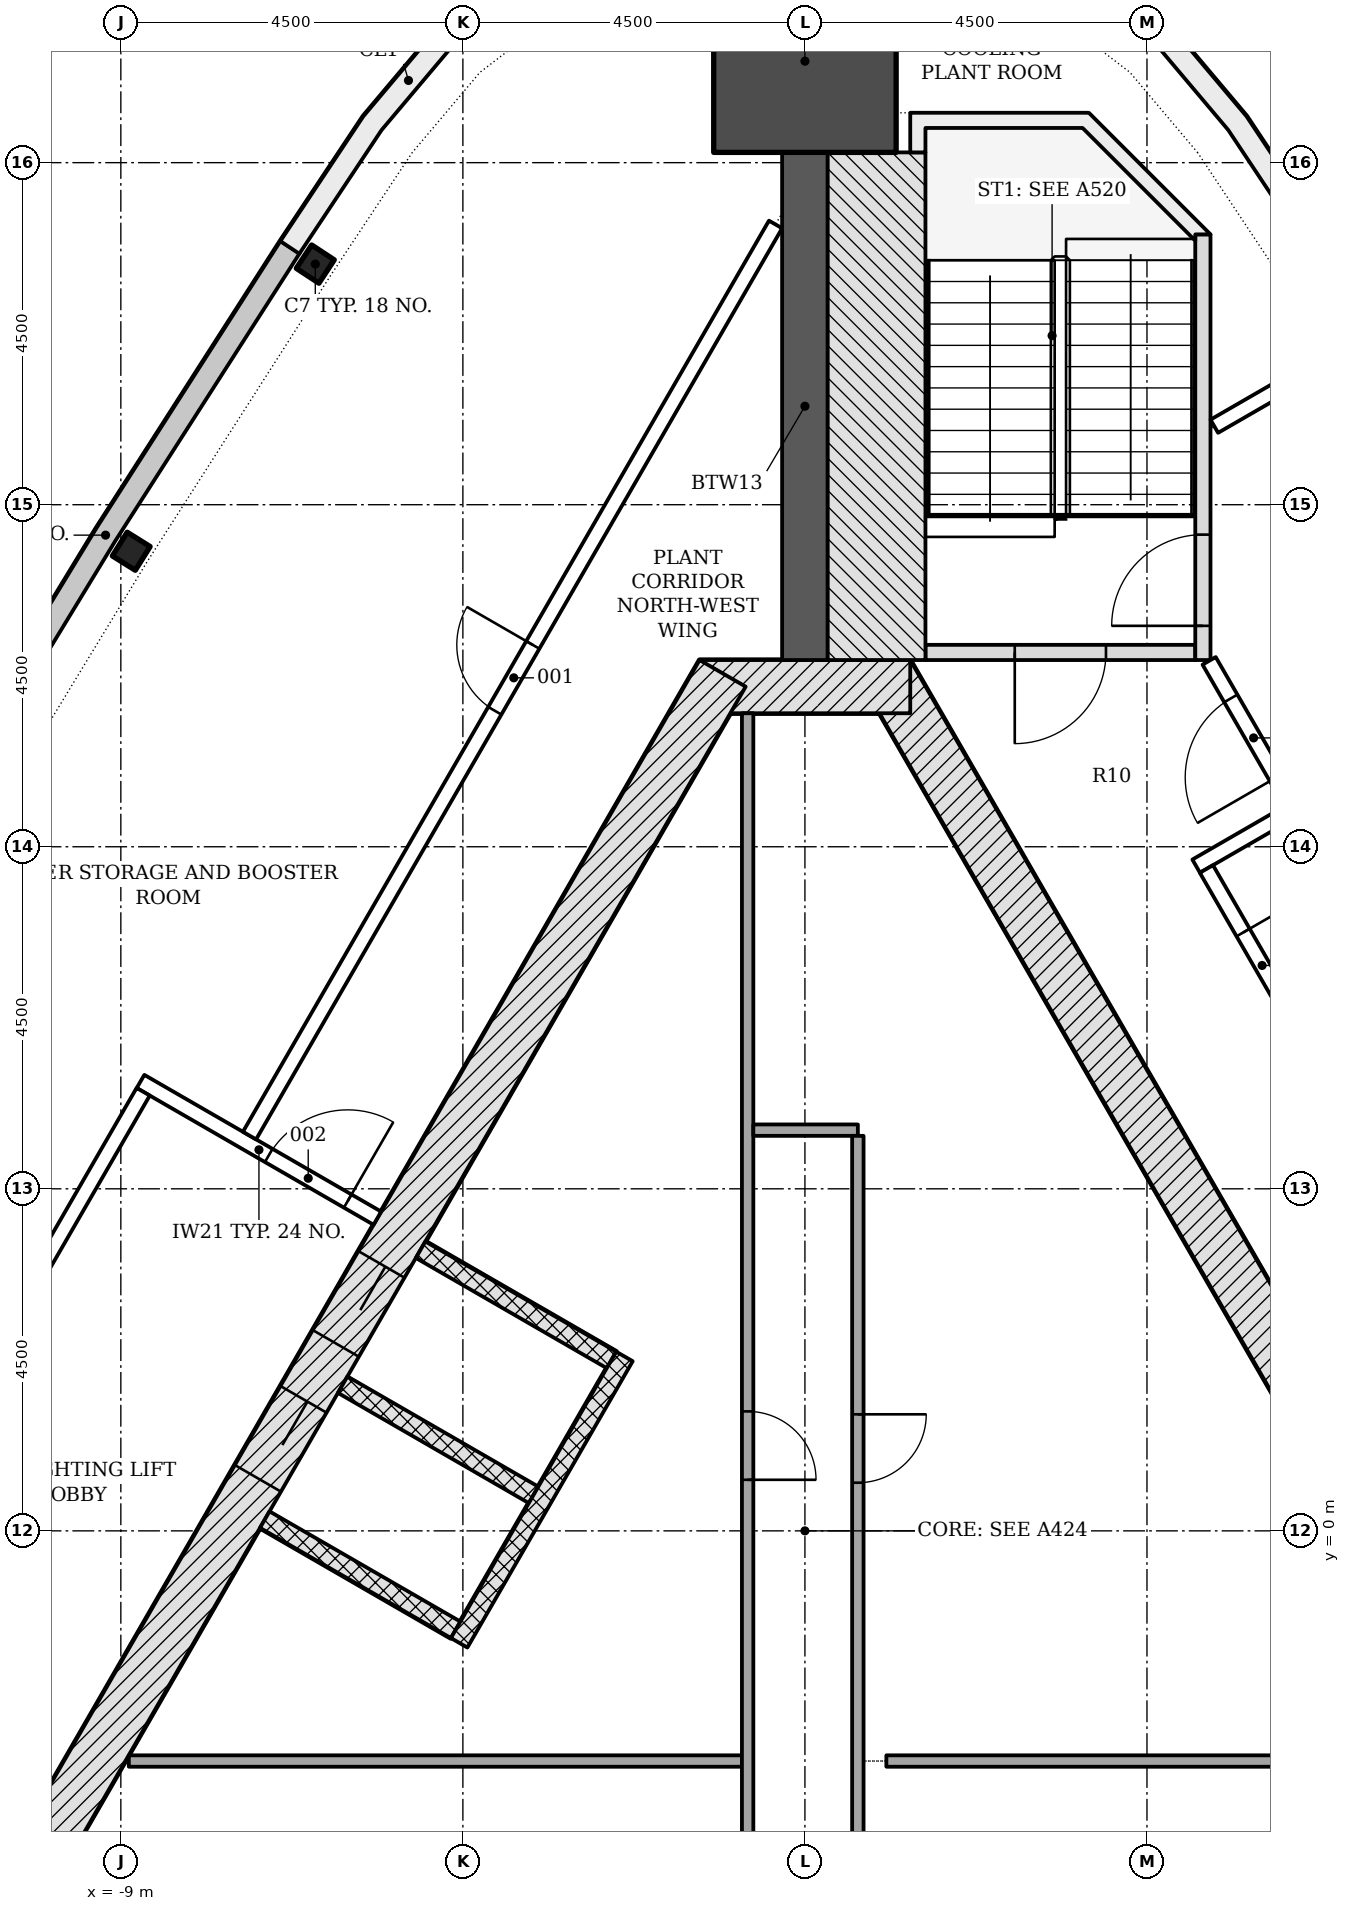
"""IFC4 building model, lengths in metres.
Left out: names, types, materials, properties, quantities, classifications, styles, units other than length and angle.
Written with IfcOpenShell. Run it as: python <this file> out.ifc"""

import sys

from ifc_helpers import new_model, si_unit, direction, frame, frame_2d, origin, origin_2d, place, context, subcontext, project, spatial, polyline, rectangle, i_section, outline, extrude, element, fill, save


model = new_model("IFC4")
c1 = context("Model", 3, precision=1e-05, world=origin(), true_north=direction((0.0, 1.0)))
c2 = subcontext(c1, "Body", "Model", "MODEL_VIEW")
j1 = project(units=[si_unit("LENGTHUNIT", "METRE"), si_unit("PLANEANGLEUNIT", "RADIAN")], contexts=[c1])
p1 = place(None, origin())
s1 = spatial("IfcSite", under=j1, at=p1, CompositionType="ELEMENT")
p2 = place(p1, origin())
s2 = spatial("IfcBuilding", under=s1, at=p2, CompositionType="ELEMENT")
p3 = place(p2, frame((0.0, 0.0, 288.6)))
s3 = spatial("IfcBuildingStorey", under=s2, at=p3, CompositionType="ELEMENT", Elevation=288.6)
p4 = place(p3, frame((10.311, -4.703, -0.25), z_axis=(0.0, 0.0, 1.0), x_axis=(-0.500001446645, 0.866024568562, 0.0)))
e1 = element("IfcWall", 1, at=p4, inside=s3, PredefinedType="SHEAR", context=c2, shape_type="SweptSolid", body=[
    extrude(rectangle(XDim=18.458, YDim=0.7, at=frame_2d((9.229, 0.0))), origin(), (0.0, 0.0, 1.0), 4.5),
])
p5 = place(p3, frame((1.386, 11.106, -0.25), z_axis=(0.0, 0.0, 1.0), x_axis=(-1.0, 0.0, 0.0)))
e2 = element("IfcWall", 2, at=p5, inside=s3, PredefinedType="SHEAR", context=c2, shape_type="SweptSolid", body=[
    extrude(rectangle(XDim=2.771, YDim=0.7, at=frame_2d((1.386, 0.0))), origin(), (0.0, 0.0, 1.0), 4.5),
])
p6 = place(p3, frame((-1.083, 11.281, -0.25), z_axis=(0.0, 0.0, 1.0), x_axis=(-0.500001446645, -0.866024568562, 0.0)))
e3 = element("IfcWall", 3, at=p6, inside=s3, PredefinedType="SHEAR", context=c2, shape_type="SweptSolid", body=[
    extrude(rectangle(XDim=18.458, YDim=0.7, at=frame_2d((9.229, 0.0))), origin(), (0.0, 0.0, 1.0), 4.5),
])
p7 = place(p6, frame((8.979, 0.0, 0.25)))
e4 = element("IfcOpeningElement", 4, at=p7, cuts=e3, PredefinedType="OPENING", context=c2, shape_type="SweptSolid", body=[
    extrude(rectangle(XDim=1.2, YDim=2.1, at=frame_2d((0.6, 1.05))), frame((0.0, 0.36, 0.0), z_axis=(0.0, -1.0, 0.0), x_axis=(1.0, 0.0, 0.0)), (0.0, 0.0, 1.0), 0.72),
])
p8 = place(p6, frame((11.029, 0.0, 0.25)))
e5 = element("IfcOpeningElement", 5, at=p8, cuts=e3, PredefinedType="OPENING", context=c2, shape_type="SweptSolid", body=[
    extrude(rectangle(XDim=1.2, YDim=2.1, at=frame_2d((0.6, 1.05))), frame((0.0, 0.36, 0.0), z_axis=(0.0, -1.0, 0.0), x_axis=(1.0, 0.0, 0.0)), (0.0, 0.0, 1.0), 0.72),
])
p9 = place(p3, frame((0.0, 11.456, -0.25), z_axis=(0.0, 0.0, 1.0), x_axis=(0.0, 1.0, 0.0)))
e6 = element("IfcWall", 6, at=p9, inside=s3, PredefinedType="SHEAR", context=c2, shape_type="SweptSolid", body=[
    extrude(rectangle(XDim=6.679, YDim=0.6, at=frame_2d((3.339, 0.0))), origin(), (0.0, 0.0, 1.0), 4.5),
])
p10 = place(p3, frame((0.0, 19.335, -0.25), z_axis=(0.0, 0.0, 1.0), x_axis=(0.0, 1.0, 0.0)))
e7 = element("IfcColumn", 7, at=p10, inside=s3, PredefinedType="COLUMN", context=c2, shape_type="SweptSolid", body=[
    extrude(rectangle(XDim=2.4, YDim=2.4, at=origin_2d()), origin(), (0.0, 0.0, 1.0), 4.5),
])
for number, where, z_axis, x_axis in (
    (8, (-6.442, 16.666, -0.25), (0.0, 0.0, 1.0), (-0.549, -0.836, 0.0)),
    (9, (-8.863, 12.888, -0.25), (0.0, 0.0, 1.0), (-0.53, -0.848, 0.0)),
):
    element("IfcColumn", number, at=place(p3, frame(where, z_axis=z_axis, x_axis=x_axis)), inside=s3, PredefinedType="COLUMN", context=c2, shape_type="SweptSolid", body=[
        extrude(i_section(OverallWidth=0.368, OverallDepth=0.356, WebThickness=0.011, FlangeThickness=0.018, FilletRadius=0.015, at=origin_2d()), origin(), (0.0, 0.0, 1.0), 4.5),
    ])
p11 = place(p3, origin())
e10 = element("IfcWall", 10, at=p11, inside=s3, PredefinedType="NOTDEFINED", context=c2, shape_type="SweptSolid", body=[
    extrude(outline(polyline([(-6.901, 16.968), (-9.33, 13.179), (-11.669, 9.335), (-11.413, 9.179), (-9.075, 13.02), (-6.649, 16.806), (-6.901, 16.968)])), origin(), (0.0, 0.0, 1.0), 4.25),
])
p12 = place(p3, origin())
e11 = element("IfcWall", 11, at=p12, inside=s3, PredefinedType="NOTDEFINED", context=c2, shape_type="SweptSolid", body=[
    extrude(outline(polyline([(6.901, 16.968), (5.81, 18.61), (4.83, 19.771), (3.623, 20.695), (2.244, 21.335), (0.76, 21.664), (-0.76, 21.664), (-2.244, 21.335), (-3.623, 20.695), (-4.83, 19.771), (-5.81, 18.61), (-6.901, 16.968), (-6.651, 16.802), (-5.569, 18.429), (-4.622, 19.553), (-3.466, 20.437), (-2.147, 21.05), (-0.727, 21.364), (0.727, 21.364), (2.147, 21.05), (3.466, 20.437), (4.622, 19.553), (5.569, 18.429), (6.651, 16.802), (6.901, 16.968)])), origin(), (0.0, 0.0, 1.0), 4.25),
])
for number, where, z_axis, x_axis in (
    (12, (-5.056, 3.699, -0.25), (0.0, 0.0, 1.0), (0.866, -0.5, 0.0)),
    (13, (-6.081, 1.923, -0.25), (0.0, 0.0, 1.0), (0.866, -0.5, 0.0)),
    (14, (-7.106, 0.148, -0.25), (0.0, 0.0, 1.0), (0.866, -0.5, 0.0)),
):
    element("IfcWall", number, at=place(p3, frame(where, z_axis=z_axis, x_axis=x_axis)), inside=s3, PredefinedType="PARTITIONING", context=c2, shape_type="SweptSolid", body=[
        extrude(rectangle(XDim=2.9, YDim=0.25, at=frame_2d((1.45, 0.0))), origin(), (0.0, 0.0, 1.0), 4.5),
    ])
p13 = place(p3, frame((-2.374, 2.294, 0.0), z_axis=(0.0, 0.0, 1.0), x_axis=(-0.499996127374, -0.866027639635, 0.0)))
e15 = element("IfcWall", 15, at=p13, inside=s3, PredefinedType="PARTITIONING", context=c2, shape_type="SweptSolid", body=[
    extrude(rectangle(XDim=4.35, YDim=0.25, at=frame_2d((2.175, 0.0))), origin(), (0.0, 0.0, 1.0), 4.25),
])
p14 = place(p3, frame((-8.895, -3.028, 0.0), z_axis=(0.0, 0.0, 1.0), x_axis=(1.0, 0.0, 0.0)))
e16 = element("IfcWall", 16, at=p14, inside=s3, PredefinedType="PARTITIONING", context=c2, shape_type="SweptSolid", body=[
    extrude(rectangle(XDim=8.066, YDim=0.15, at=frame_2d((4.033, 0.0))), origin(), (0.0, 0.0, 1.0), 4.25),
])
p15 = place(p3, frame((-0.754, 10.756, 0.0), z_axis=(0.0, 0.0, 1.0), x_axis=(0.0, -1.0, 0.0)))
e17 = element("IfcWall", 17, at=p15, inside=s3, PredefinedType="PARTITIONING", context=c2, shape_type="SweptSolid", body=[
    extrude(rectangle(XDim=16.985, YDim=0.15, at=frame_2d((8.492, 0.0))), origin(), (0.0, 0.0, 1.0), 4.25),
])
p16 = place(p15, frame((9.185, 0.0, 0.0)))
e18 = element("IfcOpeningElement", 18, at=p16, cuts=e17, PredefinedType="OPENING", context=c2, shape_type="SweptSolid", body=[
    extrude(rectangle(XDim=0.9, YDim=2.1, at=frame_2d((0.45, 1.05))), frame((0.0, 0.085, 0.0), z_axis=(0.0, -1.0, 0.0), x_axis=(1.0, 0.0, 0.0)), (0.0, 0.0, 1.0), 0.17),
])
p17 = place(p3, frame((-0.679, 5.272, 0.0), z_axis=(0.0, 0.0, 1.0), x_axis=(1.0, 0.0, 0.0)))
e19 = element("IfcWall", 19, at=p17, inside=s3, PredefinedType="PARTITIONING", context=c2, shape_type="SweptSolid", body=[
    extrude(rectangle(XDim=1.375, YDim=0.15, at=frame_2d((0.688, 0.0))), origin(), (0.0, 0.0, 1.0), 4.25),
])
p18 = place(p3, frame((0.696, 5.197, 0.0), z_axis=(0.0, 0.0, 1.0), x_axis=(0.0, -1.0, 0.0)))
e20 = element("IfcWall", 20, at=p18, inside=s3, PredefinedType="PARTITIONING", context=c2, shape_type="SweptSolid", body=[
    extrude(rectangle(XDim=11.425, YDim=0.15, at=frame_2d((5.712, 0.0))), origin(), (0.0, 0.0, 1.0), 4.25),
])
p19 = place(p18, frame((3.664, 0.0, 0.0)))
e21 = element("IfcOpeningElement", 21, at=p19, cuts=e20, PredefinedType="OPENING", context=c2, shape_type="SweptSolid", body=[
    extrude(rectangle(XDim=0.9, YDim=2.1, at=frame_2d((0.45, 1.05))), frame((0.0, 0.085, 0.0), z_axis=(0.0, -1.0, 0.0), x_axis=(1.0, 0.0, 0.0)), (0.0, 0.0, 1.0), 0.17),
])
p20 = place(p3, frame((1.071, -3.028, 0.0), z_axis=(0.0, 0.0, 1.0), x_axis=(1.0, 0.0, 0.0)))
e22 = element("IfcWall", 22, at=p20, inside=s3, PredefinedType="PARTITIONING", context=c2, shape_type="SweptSolid", body=[
    extrude(rectangle(XDim=7.824, YDim=0.15, at=frame_2d((3.912, 0.0))), origin(), (0.0, 0.0, 1.0), 4.25),
])
p21 = place(p3, frame((5.135, 11.556, -0.25), z_axis=(0.0, 0.0, 1.0), x_axis=(-1.0, 0.0, 0.0)))
e23 = element("IfcWall", 23, at=p21, inside=s3, PredefinedType="SHEAR", context=c2, shape_type="SweptSolid", body=[
    extrude(rectangle(XDim=3.55, YDim=0.2, at=frame_2d((1.775, 0.0))), origin(), (0.0, 0.0, 1.0), 4.5),
])
p22 = place(p21, frame((1.175, 0.0, 0.25)))
e24 = element("IfcOpeningElement", 24, at=p22, cuts=e23, PredefinedType="OPENING", context=c2, shape_type="SweptSolid", body=[
    extrude(rectangle(XDim=1.2, YDim=2.1, at=frame_2d((0.6, 1.05))), frame((0.0, 0.11, 0.0), z_axis=(0.0, -1.0, 0.0), x_axis=(1.0, 0.0, 0.0)), (0.0, 0.0, 1.0), 0.22),
])
p23 = place(p3, frame((5.236, 11.456, -0.25), z_axis=(0.0, 0.0, 1.0), x_axis=(0.0, 1.0, 0.0)))
e25 = element("IfcWall", 25, at=p23, inside=s3, PredefinedType="SHEAR", context=c2, shape_type="SweptSolid", body=[
    extrude(rectangle(XDim=5.6, YDim=0.2, at=frame_2d((2.8, 0.0))), origin(), (0.0, 0.0, 1.0), 4.5),
])
p24 = place(p23, frame((0.45, 0.0, 0.25)))
e26 = element("IfcOpeningElement", 26, at=p24, cuts=e25, PredefinedType="OPENING", context=c2, shape_type="SweptSolid", body=[
    extrude(rectangle(XDim=1.2, YDim=2.1, at=frame_2d((0.6, 1.05))), frame((0.0, 0.11, 0.0), z_axis=(0.0, -1.0, 0.0), x_axis=(1.0, 0.0, 0.0)), (0.0, 0.0, 1.0), 0.22),
])
p25 = place(p3, frame((0.943, 11.456, -0.25), z_axis=(0.0, 0.0, 1.0), x_axis=(0.0, 1.0, 0.0)))
e27 = element("IfcWall", 27, at=p25, inside=s3, PredefinedType="SHEAR", context=c2, shape_type="SweptSolid", body=[
    extrude(rectangle(XDim=6.679, YDim=1.286, at=frame_2d((3.339, 0.0))), origin(), (0.0, 0.0, 1.0), 4.5),
])
p26 = place(p3, frame((0.0, 0.0, -0.25)))
e28 = element("IfcWall", 28, at=p26, inside=s3, PredefinedType="SHEAR", context=c2, shape_type="SweptSolid", body=[
    extrude(outline(polyline([(5.336, 17.056), (3.736, 18.656), (1.385, 18.656), (1.385, 18.135), (1.586, 18.135), (1.586, 18.456), (3.653, 18.456), (5.135, 16.974), (5.135, 17.056), (5.135, 17.056), (5.135, 17.056), (5.135, 17.056), (5.135, 17.056), (5.135, 17.056), (5.135, 17.056), (5.135, 17.056), (5.135, 17.056), (5.135, 17.056), (5.135, 17.056), (5.135, 17.056), (5.135, 17.056), (5.135, 17.056), (5.135, 17.056), (5.135, 17.056), (5.135, 17.056), (5.336, 17.056)])), origin(), (0.0, 0.0, 1.0), 4.5),
])
p27 = place(p3, frame((-8.741, 5.913, 0.0), z_axis=(0.0, 0.0, 1.0), x_axis=(0.866017220491, -0.500014173611, 0.0)))
e29 = element("IfcWall", 29, at=p27, inside=s3, PredefinedType="PARTITIONING", context=c2, shape_type="SweptSolid", body=[
    extrude(rectangle(XDim=3.598, YDim=0.2, at=frame_2d((1.799, 0.0))), origin(), (0.0, 0.0, 1.0), 4.25),
])
p28 = place(p27, frame((1.948, 0.0, 0.0)))
e30 = element("IfcOpeningElement", 30, at=p28, cuts=e29, PredefinedType="OPENING", context=c2, shape_type="SweptSolid", body=[
    extrude(rectangle(XDim=1.2, YDim=2.1, at=frame_2d((0.6, 1.05))), frame((0.0, 0.11, 0.0), z_axis=(0.0, -1.0, 0.0), x_axis=(1.0, 0.0, 0.0)), (0.0, 0.0, 1.0), 0.22),
])
p29 = place(p3, frame((-12.658, -1.068, 0.0), z_axis=(0.0, 0.0, 1.0), x_axis=(0.499996073327, 0.866027670838, 0.0)))
e31 = element("IfcWall", 31, at=p29, inside=s3, PredefinedType="PARTITIONING", context=c2, shape_type="SweptSolid", body=[
    extrude(rectangle(XDim=7.904, YDim=0.2, at=frame_2d((3.952, 0.0))), origin(), (0.0, 0.0, 1.0), 3.702),
])
p30 = place(p29, frame((0.541, 0.0, 0.0)))
e32 = element("IfcOpeningElement", 32, at=p30, cuts=e31, PredefinedType="OPENING", context=c2, shape_type="SweptSolid", body=[
    extrude(rectangle(XDim=1.2, YDim=2.1, at=frame_2d((0.6, 1.05))), frame((0.0, 0.11, 0.0), z_axis=(0.0, -1.0, 0.0), x_axis=(1.0, 0.0, 0.0)), (0.0, 0.0, 1.0), 0.22),
])
p31 = place(p3, frame((-7.307, 5.2, 0.0), z_axis=(0.0, 0.0, 1.0), x_axis=(0.49999780173, 0.866026672953, 0.0)))
e33 = element("IfcWall", 33, at=p31, inside=s3, PredefinedType="PARTITIONING", context=c2, shape_type="SweptSolid", body=[
    extrude(rectangle(XDim=13.841, YDim=0.2, at=frame_2d((6.92, 0.0))), origin(), (0.0, 0.0, 1.0), 3.702),
])
p32 = place(p31, frame((6.454, 0.0, 0.0)))
e34 = element("IfcOpeningElement", 34, at=p32, cuts=e33, PredefinedType="OPENING", context=c2, shape_type="SweptSolid", body=[
    extrude(rectangle(XDim=1.0, YDim=2.1, at=frame_2d((0.5, 1.05))), frame((0.0, 0.11, 0.0), z_axis=(0.0, -1.0, 0.0), x_axis=(1.0, 0.0, 0.0)), (0.0, 0.0, 1.0), 0.22),
])
p33 = place(p3, frame((5.147, 8.745, 0.0), z_axis=(0.0, 0.0, 1.0), x_axis=(0.865987117328, 0.500066308224, 0.0)))
e35 = element("IfcWall", 35, at=p33, inside=s3, PredefinedType="PARTITIONING", context=c2, shape_type="SweptSolid", body=[
    extrude(rectangle(XDim=1.598, YDim=0.2, at=frame_2d((0.799, 0.0))), origin(), (0.0, 0.0, 1.0), 4.25),
])
p34 = place(p3, frame((6.395, 9.581, 0.0), z_axis=(0.0, 0.0, 1.0), x_axis=(-0.500003735859, 0.866023246874, 0.0)))
e36 = element("IfcWall", 36, at=p34, inside=s3, PredefinedType="PARTITIONING", context=c2, shape_type="SweptSolid", body=[
    extrude(rectangle(XDim=2.154, YDim=0.2, at=frame_2d((1.077, 0.0))), origin(), (0.0, 0.0, 1.0), 3.702),
])
p35 = place(p34, frame((0.383, 0.0, 0.0)))
e37 = element("IfcOpeningElement", 37, at=p35, cuts=e36, PredefinedType="OPENING", context=c2, shape_type="SweptSolid", body=[
    extrude(rectangle(XDim=1.2, YDim=2.1, at=frame_2d((0.6, 1.05))), frame((0.0, 0.11, 0.0), z_axis=(0.0, -1.0, 0.0), x_axis=(1.0, 0.0, 0.0)), (0.0, 0.0, 1.0), 0.22),
])
p36 = place(p3, frame((5.282, 8.708, 0.0), z_axis=(0.0, 0.0, 1.0), x_axis=(0.500001848211, -0.866024336717, 0.0)))
e38 = element("IfcWall", 38, at=p36, inside=s3, PredefinedType="PARTITIONING", context=c2, shape_type="SweptSolid", body=[
    extrude(rectangle(XDim=19.591, YDim=0.2, at=frame_2d((9.795, 0.0))), origin(), (0.0, 0.0, 1.0), 3.702),
])
p37 = place(p36, frame((12.923, 0.0, 0.0)))
e39 = element("IfcOpeningElement", 39, at=p37, cuts=e38, PredefinedType="OPENING", context=c2, shape_type="SweptSolid", body=[
    extrude(rectangle(XDim=1.0, YDim=2.1, at=frame_2d((0.5, 1.05))), frame((0.0, 0.11, 0.0), z_axis=(0.0, -1.0, 0.0), x_axis=(1.0, 0.0, 0.0)), (0.0, 0.0, 1.0), 0.22),
])
p38 = place(p36, frame((4.502, 0.0, 0.0)))
e40 = element("IfcOpeningElement", 40, at=p38, cuts=e38, PredefinedType="OPENING", context=c2, shape_type="SweptSolid", body=[
    extrude(rectangle(XDim=1.0, YDim=2.1, at=frame_2d((0.5, 1.05))), frame((0.0, 0.11, 0.0), z_axis=(0.0, -1.0, 0.0), x_axis=(1.0, 0.0, 0.0)), (0.0, 0.0, 1.0), 0.22),
])
p39 = place(p36, frame((0.965, 0.0, 0.0)))
e41 = element("IfcOpeningElement", 41, at=p39, cuts=e38, PredefinedType="OPENING", context=c2, shape_type="SweptSolid", body=[
    extrude(rectangle(XDim=1.0, YDim=2.1, at=frame_2d((0.5, 1.05))), frame((0.0, 0.11, 0.0), z_axis=(0.0, -1.0, 0.0), x_axis=(1.0, 0.0, 0.0)), (0.0, 0.0, 1.0), 0.22),
])
p40 = place(p3, frame((6.529, 15.192, 0.0), z_axis=(0.0, 0.0, 1.0), x_axis=(-0.866117824122, -0.499839889103, 0.0)))
e42 = element("IfcWall", 42, at=p40, inside=s3, PredefinedType="PARTITIONING", context=c2, shape_type="SweptSolid", body=[
    extrude(rectangle(XDim=1.32, YDim=0.2, at=frame_2d((0.66, 0.0))), origin(), (0.0, 0.0, 1.0), 4.25),
])
p41 = place(p7, origin())
e43 = element("IfcDoor", 43, at=p41, inside=s3, OperationType="DOUBLE_DOOR_SLIDING", PredefinedType="DOOR", context=c2, shape_type="SweptSolid", body=[
    extrude(rectangle(XDim=1.2, YDim=2.1, at=frame_2d((0.6, 1.05))), frame((0.0, 0.025, 0.0), z_axis=(0.0, -1.0, 0.0), x_axis=(1.0, 0.0, 0.0)), (0.0, 0.0, 1.0), 0.05),
])
fill(e4, e43)
p42 = place(p8, origin())
e44 = element("IfcDoor", 44, at=p42, inside=s3, OperationType="DOUBLE_DOOR_SLIDING", PredefinedType="DOOR", context=c2, shape_type="SweptSolid", body=[
    extrude(rectangle(XDim=1.2, YDim=2.1, at=frame_2d((0.6, 1.05))), frame((0.0, 0.025, 0.0), z_axis=(0.0, -1.0, 0.0), x_axis=(1.0, 0.0, 0.0)), (0.0, 0.0, 1.0), 0.05),
])
fill(e5, e44)
p43 = place(p16, origin())
e45 = element("IfcDoor", 45, at=p43, inside=s3, OperationType="SINGLE_SWING_RIGHT", PredefinedType="DOOR", context=c2, shape_type="SweptSolid", body=[
    extrude(rectangle(XDim=0.9, YDim=2.1, at=frame_2d((0.45, 1.05))), frame((0.0, 0.025, 0.0), z_axis=(0.0, -1.0, 0.0), x_axis=(1.0, 0.0, 0.0)), (0.0, 0.0, 1.0), 0.05),
])
fill(e18, e45)
p44 = place(p19, origin())
e46 = element("IfcDoor", 46, at=p44, inside=s3, OperationType="SINGLE_SWING_LEFT", PredefinedType="DOOR", context=c2, shape_type="SweptSolid", body=[
    extrude(rectangle(XDim=0.9, YDim=2.1, at=frame_2d((0.45, 1.05))), frame((0.0, 0.025, 0.0), z_axis=(0.0, -1.0, 0.0), x_axis=(1.0, 0.0, 0.0)), (0.0, 0.0, 1.0), 0.05),
])
fill(e21, e46)
p45 = place(p22, origin())
e47 = element("IfcDoor", 47, at=p45, inside=s3, OperationType="SINGLE_SWING_RIGHT", PredefinedType="DOOR", context=c2, shape_type="SweptSolid", body=[
    extrude(rectangle(XDim=1.2, YDim=2.1, at=frame_2d((0.6, 1.05))), frame((0.0, 0.025, 0.0), z_axis=(0.0, -1.0, 0.0), x_axis=(1.0, 0.0, 0.0)), (0.0, 0.0, 1.0), 0.05),
])
fill(e24, e47)
p46 = place(p24, origin())
e48 = element("IfcDoor", 48, at=p46, inside=s3, OperationType="SINGLE_SWING_LEFT", PredefinedType="DOOR", context=c2, shape_type="SweptSolid", body=[
    extrude(rectangle(XDim=1.2, YDim=2.1, at=frame_2d((0.6, 1.05))), frame((0.0, 0.025, 0.0), z_axis=(0.0, -1.0, 0.0), x_axis=(1.0, 0.0, 0.0)), (0.0, 0.0, 1.0), 0.05),
])
fill(e26, e48)
p47 = place(p32, origin())
e49 = element("IfcDoor", 49, at=p47, inside=s3, OperationType="SINGLE_SWING_RIGHT", PredefinedType="DOOR", context=c2, shape_type="SweptSolid", body=[
    extrude(rectangle(XDim=1.0, YDim=2.1, at=frame_2d((0.5, 1.05))), frame((0.0, 0.025, 0.0), z_axis=(0.0, -1.0, 0.0), x_axis=(1.0, 0.0, 0.0)), (0.0, 0.0, 1.0), 0.05),
])
fill(e34, e49)
p48 = place(p28, origin())
e50 = element("IfcDoor", 50, at=p48, inside=s3, OperationType="SINGLE_SWING_RIGHT", PredefinedType="DOOR", context=c2, shape_type="SweptSolid", body=[
    extrude(rectangle(XDim=1.2, YDim=2.1, at=frame_2d((0.6, 1.05))), frame((0.0, 0.025, 0.0), z_axis=(0.0, -1.0, 0.0), x_axis=(1.0, 0.0, 0.0)), (0.0, 0.0, 1.0), 0.05),
])
fill(e30, e50)
p49 = place(p39, origin())
e51 = element("IfcDoor", 51, at=p49, inside=s3, OperationType="SINGLE_SWING_LEFT", PredefinedType="DOOR", context=c2, shape_type="SweptSolid", body=[
    extrude(rectangle(XDim=1.0, YDim=2.1, at=frame_2d((0.5, 1.05))), frame((0.0, 0.025, 0.0), z_axis=(0.0, -1.0, 0.0), x_axis=(1.0, 0.0, 0.0)), (0.0, 0.0, 1.0), 0.05),
])
fill(e41, e51)
p50 = place(p35, origin())
e52 = element("IfcDoor", 52, at=p50, inside=s3, OperationType="SINGLE_SWING_LEFT", PredefinedType="DOOR", context=c2, shape_type="SweptSolid", body=[
    extrude(rectangle(XDim=1.2, YDim=2.1, at=frame_2d((0.6, 1.05))), frame((0.0, 0.025, 0.0), z_axis=(0.0, -1.0, 0.0), x_axis=(1.0, 0.0, 0.0)), (0.0, 0.0, 1.0), 0.05),
])
fill(e37, e52)
save(model, sys.argv[1])
